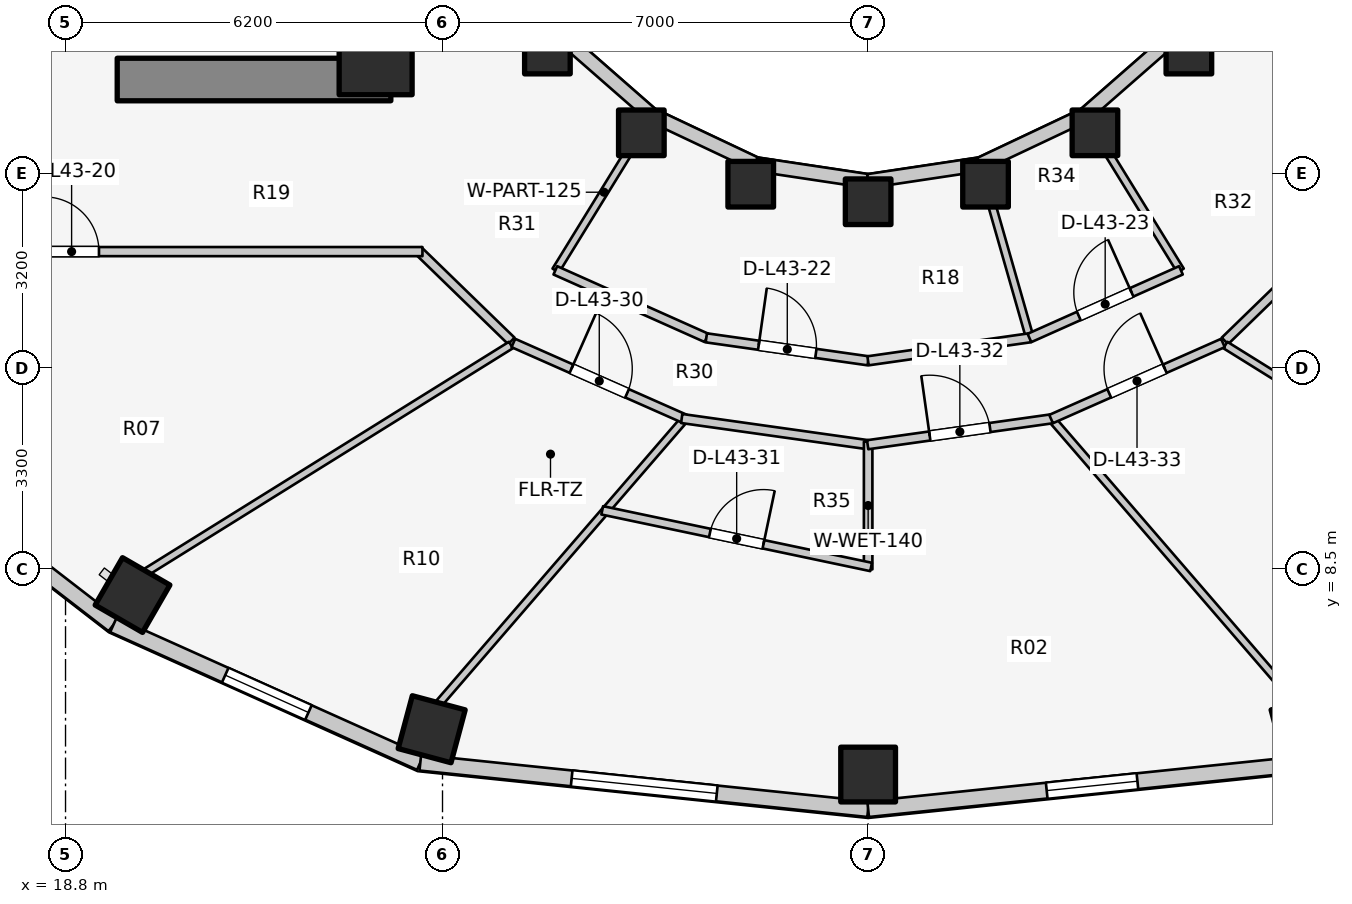
"""IFC4 building model, lengths in metres.
Left out: names, types, materials, properties, quantities, classifications, styles, units other than length and angle.
Written with IfcOpenShell. Run it as: python <this file> out.ifc"""

import sys

from ifc_helpers import new_model, si_unit, direction, frame, frame_2d, origin, origin_2d, place, context, subcontext, project, spatial, rectangle, extrude, element, fill, save


model = new_model("IFC4")
c1 = context("Model", 3, precision=1e-05, world=origin(), true_north=direction((0.0, 1.0)))
c2 = subcontext(c1, "Body", "Model", "MODEL_VIEW")
j1 = project(units=[si_unit("LENGTHUNIT", "METRE"), si_unit("PLANEANGLEUNIT", "RADIAN")], contexts=[c1])
p1 = place(None, origin())
s1 = spatial("IfcSite", under=j1, at=p1, CompositionType="ELEMENT")
p2 = place(p1, origin())
s2 = spatial("IfcBuilding", under=s1, at=p2, CompositionType="ELEMENT")
p3 = place(p2, frame((0.0, 0.0, 143.6)))
s3 = spatial("IfcBuildingStorey", under=s2, at=p3, CompositionType="ELEMENT", Elevation=143.6)
p4 = place(p3, frame((19.65, 16.55, 0.0), z_axis=(0.0, 0.0, 1.0), x_axis=(1.0, 0.0, 0.0)))
e1 = element("IfcWall", 1, at=p4, inside=s3, PredefinedType="SHEAR", context=c2, shape_type="SweptSolid", body=[
    extrude(rectangle(XDim=4.5, YDim=0.7, at=frame_2d((2.25, 0.0))), origin(), (0.0, 0.0, 1.0), 3.1),
])
p5 = place(p3, frame((23.9, 16.9, 0.0), z_axis=(0.0, 0.0, 1.0), x_axis=(1.0, 0.0, 0.0)))
e2 = element("IfcColumn", 2, at=p5, inside=s3, PredefinedType="COLUMN", context=c2, shape_type="SweptSolid", body=[
    extrude(rectangle(XDim=1.2, YDim=1.2, at=origin_2d()), origin(), (0.0, 0.0, 1.0), 3.1),
])
for number, where, z_axis, x_axis in (
    (3, (26.725, 17.018, 0.0), (0.0, 0.0, 1.0), (1.0, 0.0, 0.0)),
    (4, (28.27, 15.673, 0.0), (0.0, 0.0, 1.0), (1.0, 0.0, 0.0)),
):
    element("IfcColumn", number, at=place(p3, frame(where, z_axis=z_axis, x_axis=x_axis)), inside=s3, PredefinedType="COLUMN", context=c2, shape_type="SweptSolid", body=[
        extrude(rectangle(XDim=0.75, YDim=0.75, at=origin_2d()), origin(), (0.0, 0.0, 1.0), 3.1),
    ])
p6 = place(p3, frame((19.902, 8.072, 0.0), z_axis=(0.0, 0.0, 1.0), x_axis=(-0.5, -0.866025403784, 0.0)))
e5 = element("IfcColumn", 5, at=p6, inside=s3, PredefinedType="COLUMN", context=c2, shape_type="SweptSolid", body=[
    extrude(rectangle(XDim=0.9, YDim=0.9, at=origin_2d()), origin(), (0.0, 0.0, 1.0), 3.1),
])
p7 = place(p3, frame((30.069, 14.828, 0.0), z_axis=(0.0, 0.0, 1.0), x_axis=(1.0, 0.0, 0.0)))
e6 = element("IfcColumn", 6, at=p7, inside=s3, PredefinedType="COLUMN", context=c2, shape_type="SweptSolid", body=[
    extrude(rectangle(XDim=0.75, YDim=0.75, at=origin_2d()), origin(), (0.0, 0.0, 1.0), 3.1),
])
p8 = place(p3, frame((24.822, 5.865, 0.0), z_axis=(0.0, 0.0, 1.0), x_axis=(-0.258819045103, -0.965925826289, 0.0)))
e7 = element("IfcColumn", 7, at=p8, inside=s3, PredefinedType="COLUMN", context=c2, shape_type="SweptSolid", body=[
    extrude(rectangle(XDim=0.9, YDim=0.9, at=origin_2d()), origin(), (0.0, 0.0, 1.0), 3.1),
])
p9 = place(p3, frame((32.0, 14.54, 0.0), z_axis=(0.0, 0.0, 1.0), x_axis=(1.0, 0.0, 0.0)))
e8 = element("IfcColumn", 8, at=p9, inside=s3, PredefinedType="COLUMN", context=c2, shape_type="SweptSolid", body=[
    extrude(rectangle(XDim=0.75, YDim=0.75, at=origin_2d()), origin(), (0.0, 0.0, 1.0), 3.1),
])
p10 = place(p3, frame((32.0, 5.12, 0.0), z_axis=(0.0, 0.0, 1.0), x_axis=(0.0, -1.0, 0.0)))
e9 = element("IfcColumn", 9, at=p10, inside=s3, PredefinedType="COLUMN", context=c2, shape_type="SweptSolid", body=[
    extrude(rectangle(XDim=0.9, YDim=0.9, at=origin_2d()), origin(), (0.0, 0.0, 1.0), 3.1),
])
p11 = place(p3, frame((33.931, 14.828, 0.0), z_axis=(0.0, 0.0, 1.0), x_axis=(1.0, 0.0, 0.0)))
e10 = element("IfcColumn", 10, at=p11, inside=s3, PredefinedType="COLUMN", context=c2, shape_type="SweptSolid", body=[
    extrude(rectangle(XDim=0.75, YDim=0.75, at=origin_2d()), origin(), (0.0, 0.0, 1.0), 3.1),
])
p12 = place(p3, frame((39.178, 5.865, 0.0), z_axis=(0.0, 0.0, 1.0), x_axis=(0.258819045103, -0.965925826289, 0.0)))
e11 = element("IfcColumn", 11, at=p12, inside=s3, PredefinedType="COLUMN", context=c2, shape_type="SweptSolid", body=[
    extrude(rectangle(XDim=0.9, YDim=0.9, at=origin_2d()), origin(), (0.0, 0.0, 1.0), 3.1),
])
for number, where, z_axis, x_axis in (
    (12, (35.73, 15.673, 0.0), (0.0, 0.0, 1.0), (1.0, 0.0, 0.0)),
    (13, (37.275, 17.018, 0.0), (0.0, 0.0, 1.0), (1.0, 0.0, 0.0)),
):
    element("IfcColumn", number, at=place(p3, frame(where, z_axis=z_axis, x_axis=x_axis)), inside=s3, PredefinedType="COLUMN", context=c2, shape_type="SweptSolid", body=[
        extrude(rectangle(XDim=0.75, YDim=0.75, at=origin_2d()), origin(), (0.0, 0.0, 1.0), 3.1),
    ])
p13 = place(p3, frame((26.965, 17.258, 0.0), z_axis=(0.0, 0.0, 1.0), x_axis=(0.752576694707, -0.658504607869, 0.0)))
e14 = element("IfcWall", 14, at=p13, inside=s3, PredefinedType="STANDARD", context=c2, shape_type="SweptSolid", body=[
    extrude(rectangle(XDim=1.959, YDim=0.23, at=frame_2d((0.98, 0.0))), origin(), (0.0, 0.0, 1.0), 2.16),
])
p14 = place(p3, frame((28.44, 15.968, 0.0), z_axis=(0.0, 0.0, 1.0), x_axis=(0.904179699603, -0.427152280606, 0.0)))
e15 = element("IfcWall", 15, at=p14, inside=s3, PredefinedType="STANDARD", context=c2, shape_type="SweptSolid", body=[
    extrude(rectangle(XDim=1.899, YDim=0.23, at=frame_2d((0.95, 0.0))), origin(), (0.0, 0.0, 1.0), 2.16),
])
for number, where, z_axis, x_axis in (
    (16, (30.157, 15.157, 0.0), (0.0, 0.0, 1.0), (0.989, -0.149, 0.0)),
    (17, (32.0, 14.88, 0.0), (0.0, 0.0, 1.0), (0.989, 0.149, 0.0)),
):
    element("IfcWall", number, at=place(p3, frame(where, z_axis=z_axis, x_axis=x_axis)), inside=s3, PredefinedType="STANDARD", context=c2, shape_type="SweptSolid", body=[
        extrude(rectangle(XDim=1.864, YDim=0.23, at=frame_2d((0.932, 0.0))), origin(), (0.0, 0.0, 1.0), 2.16),
    ])
p15 = place(p3, frame((33.843, 15.157, 0.0), z_axis=(0.0, 0.0, 1.0), x_axis=(0.904179699603, 0.427152280606, 0.0)))
e18 = element("IfcWall", 18, at=p15, inside=s3, PredefinedType="STANDARD", context=c2, shape_type="SweptSolid", body=[
    extrude(rectangle(XDim=1.899, YDim=0.23, at=frame_2d((0.95, 0.0))), origin(), (0.0, 0.0, 1.0), 2.16),
])
p16 = place(p3, frame((35.56, 15.968, 0.0), z_axis=(0.0, 0.0, 1.0), x_axis=(0.752576694707, 0.658504607869, 0.0)))
e19 = element("IfcWall", 19, at=p16, inside=s3, PredefinedType="STANDARD", context=c2, shape_type="SweptSolid", body=[
    extrude(rectangle(XDim=1.959, YDim=0.23, at=frame_2d((0.98, 0.0))), origin(), (0.0, 0.0, 1.0), 2.16),
])
p17 = place(p3, frame((15.731, 10.559, 0.0), z_axis=(0.0, 0.0, 1.0), x_axis=(0.791460185804, -0.611220724687, 0.0)))
e20 = element("IfcWall", 20, at=p17, inside=s3, PredefinedType="STANDARD", context=c2, shape_type="SweptSolid", body=[
    extrude(rectangle(XDim=4.872, YDim=0.26, at=frame_2d((2.436, 0.0))), origin(), (0.0, 0.0, 1.0), 2.85),
])
p18 = place(p3, frame((19.587, 7.581, 0.0), z_axis=(0.0, 0.0, 1.0), x_axis=(0.912353637112, -0.409403029847, 0.0)))
e21 = element("IfcWall", 21, at=p18, inside=s3, PredefinedType="STANDARD", context=c2, shape_type="SweptSolid", body=[
    extrude(rectangle(XDim=5.533, YDim=0.26, at=frame_2d((2.766, 0.0))), origin(), (0.0, 0.0, 1.0), 2.85),
])
p19 = place(p18, frame((2.016, 0.0, 0.75)))
e22 = element("IfcOpeningElement", 22, at=p19, cuts=e21, PredefinedType="OPENING", context=c2, shape_type="SweptSolid", body=[
    extrude(rectangle(XDim=1.5, YDim=1.6, at=frame_2d((0.75, 0.8))), frame((0.0, 0.14, 0.0), z_axis=(0.0, -1.0, 0.0), x_axis=(1.0, 0.0, 0.0)), (0.0, 0.0, 1.0), 0.28),
])
p20 = place(p3, frame((24.635, 5.315, 0.0), z_axis=(0.0, 0.0, 1.0), x_axis=(0.994664178965, -0.10316574569, 0.0)))
e23 = element("IfcWall", 23, at=p20, inside=s3, PredefinedType="STANDARD", context=c2, shape_type="SweptSolid", body=[
    extrude(rectangle(XDim=7.405, YDim=0.26, at=frame_2d((3.702, 0.0))), origin(), (0.0, 0.0, 1.0), 2.85),
])
p21 = place(p20, frame((2.502, 0.0, 0.75)))
e24 = element("IfcOpeningElement", 24, at=p21, cuts=e23, PredefinedType="OPENING", context=c2, shape_type="SweptSolid", body=[
    extrude(rectangle(XDim=2.4, YDim=1.7, at=frame_2d((1.2, 0.85))), frame((0.0, 0.14, 0.0), z_axis=(0.0, -1.0, 0.0), x_axis=(1.0, 0.0, 0.0)), (0.0, 0.0, 1.0), 0.28),
])
p22 = place(p3, frame((32.0, 4.552, 0.0), z_axis=(0.0, 0.0, 1.0), x_axis=(0.994664178965, 0.10316574569, 0.0)))
e25 = element("IfcWall", 25, at=p22, inside=s3, PredefinedType="STANDARD", context=c2, shape_type="SweptSolid", body=[
    extrude(rectangle(XDim=7.405, YDim=0.26, at=frame_2d((3.702, 0.0))), origin(), (0.0, 0.0, 1.0), 2.85),
])
p23 = place(p22, frame((2.952, 0.0, 0.75)))
e26 = element("IfcOpeningElement", 26, at=p23, cuts=e25, PredefinedType="OPENING", context=c2, shape_type="SweptSolid", body=[
    extrude(rectangle(XDim=1.5, YDim=1.6, at=frame_2d((0.75, 0.8))), frame((0.0, 0.14, 0.0), z_axis=(0.0, -1.0, 0.0), x_axis=(1.0, 0.0, 0.0)), (0.0, 0.0, 1.0), 0.28),
])
p24 = place(p3, frame((26.133, 12.251, 0.0), z_axis=(0.0, 0.0, 1.0), x_axis=(-0.717419568599, 0.696641344302, 0.0)))
e27 = element("IfcWall", 27, at=p24, inside=s3, PredefinedType="PARTITIONING", context=c2, shape_type="SweptSolid", body=[
    extrude(rectangle(XDim=2.138, YDim=0.15, at=frame_2d((1.069, 0.0))), origin(), (0.0, 0.0, 1.0), 2.299),
])
p25 = place(p3, frame((17.15, 13.72, 0.0), z_axis=(0.0, 0.0, 1.0), x_axis=(1.0, 0.0, 0.0)))
e28 = element("IfcWall", 28, at=p25, inside=s3, PredefinedType="PARTITIONING", context=c2, shape_type="SweptSolid", body=[
    extrude(rectangle(XDim=7.52, YDim=0.15, at=frame_2d((3.76, 0.0))), origin(), (0.0, 0.0, 1.0), 2.299),
])
p26 = place(p25, frame((1.3, 0.0, 0.0)))
e29 = element("IfcOpeningElement", 29, at=p26, cuts=e28, PredefinedType="OPENING", context=c2, shape_type="SweptSolid", body=[
    extrude(rectangle(XDim=0.9, YDim=2.1, at=frame_2d((0.45, 1.05))), frame((0.0, 0.085, 0.0), z_axis=(0.0, -1.0, 0.0), x_axis=(1.0, 0.0, 0.0)), (0.0, 0.0, 1.0), 0.17),
])
p27 = place(p3, frame((37.867, 12.251, 0.0), z_axis=(0.0, 0.0, 1.0), x_axis=(0.717419568599, 0.696641344302, 0.0)))
e30 = element("IfcWall", 30, at=p27, inside=s3, PredefinedType="PARTITIONING", context=c2, shape_type="SweptSolid", body=[
    extrude(rectangle(XDim=2.138, YDim=0.15, at=frame_2d((1.069, 0.0))), origin(), (0.0, 0.0, 1.0), 2.299),
])
p28 = place(p3, frame((28.45, 15.985, 0.0), z_axis=(0.0, 0.0, 1.0), x_axis=(-0.524565340045, -0.851370192116, 0.0)))
e31 = element("IfcWall", 31, at=p28, inside=s3, PredefinedType="PARTITIONING", context=c2, shape_type="SweptSolid", body=[
    extrude(rectangle(XDim=3.027, YDim=0.125, at=frame_2d((1.514, 0.0))), origin(), (0.0, 0.0, 1.0), 2.299),
])
p29 = place(p3, frame((33.838, 15.176, 0.0), z_axis=(0.0, 0.0, 1.0), x_axis=(0.274947609893, -0.961459209647, 0.0)))
e32 = element("IfcWall", 32, at=p29, inside=s3, PredefinedType="PARTITIONING", context=c2, shape_type="SweptSolid", body=[
    extrude(rectangle(XDim=2.99, YDim=0.125, at=frame_2d((1.495, 0.0))), origin(), (0.0, 0.0, 1.0), 2.299),
])
p30 = place(p3, frame((35.55, 15.985, 0.0), z_axis=(0.0, 0.0, 1.0), x_axis=(0.524565340045, -0.851370192116, 0.0)))
e33 = element("IfcWall", 33, at=p30, inside=s3, PredefinedType="PARTITIONING", context=c2, shape_type="SweptSolid", body=[
    extrude(rectangle(XDim=3.027, YDim=0.125, at=frame_2d((1.514, 0.0))), origin(), (0.0, 0.0, 1.0), 2.299),
])
p31 = place(p3, frame((26.856, 13.412, 0.0), z_axis=(0.0, 0.0, 1.0), x_axis=(0.912985265053, -0.407992531545, 0.0)))
e34 = element("IfcWall", 34, at=p31, inside=s3, PredefinedType="PARTITIONING", context=c2, shape_type="SweptSolid", body=[
    extrude(rectangle(XDim=2.723, YDim=0.15, at=frame_2d((1.362, 0.0))), origin(), (0.0, 0.0, 1.0), 2.299),
])
p32 = place(p3, frame((29.339, 12.302, 0.0), z_axis=(0.0, 0.0, 1.0), x_axis=(0.990079774468, -0.140506370634, 0.0)))
e35 = element("IfcWall", 35, at=p32, inside=s3, PredefinedType="PARTITIONING", context=c2, shape_type="SweptSolid", body=[
    extrude(rectangle(XDim=2.69, YDim=0.15, at=frame_2d((1.345, 0.0))), origin(), (0.0, 0.0, 1.0), 2.299),
])
p33 = place(p32, frame((0.87, 0.0, 0.0)))
e36 = element("IfcOpeningElement", 36, at=p33, cuts=e35, PredefinedType="OPENING", context=c2, shape_type="SweptSolid", body=[
    extrude(rectangle(XDim=0.95, YDim=2.1, at=frame_2d((0.475, 1.05))), frame((0.0, 0.085, 0.0), z_axis=(0.0, -1.0, 0.0), x_axis=(1.0, 0.0, 0.0)), (0.0, 0.0, 1.0), 0.17),
])
p34 = place(p3, frame((31.998, 11.924, 0.0), z_axis=(0.0, 0.0, 1.0), x_axis=(0.990041682628, 0.140774524184, 0.0)))
e37 = element("IfcWall", 37, at=p34, inside=s3, PredefinedType="PARTITIONING", context=c2, shape_type="SweptSolid", body=[
    extrude(rectangle(XDim=2.695, YDim=0.15, at=frame_2d((1.348, 0.0))), origin(), (0.0, 0.0, 1.0), 2.299),
])
p35 = place(p3, frame((34.653, 12.299, 0.0), z_axis=(0.0, 0.0, 1.0), x_axis=(0.913112902883, 0.407706789971, 0.0)))
e38 = element("IfcWall", 38, at=p35, inside=s3, PredefinedType="PARTITIONING", context=c2, shape_type="SweptSolid", body=[
    extrude(rectangle(XDim=2.729, YDim=0.15, at=frame_2d((1.364, 0.0))), origin(), (0.0, 0.0, 1.0), 2.299),
])
p36 = place(p35, frame((0.889, 0.0, 0.0)))
e39 = element("IfcOpeningElement", 39, at=p36, cuts=e38, PredefinedType="OPENING", context=c2, shape_type="SweptSolid", body=[
    extrude(rectangle(XDim=0.95, YDim=2.1, at=frame_2d((0.475, 1.05))), frame((0.0, 0.085, 0.0), z_axis=(0.0, -1.0, 0.0), x_axis=(1.0, 0.0, 0.0)), (0.0, 0.0, 1.0), 0.17),
])
p37 = place(p3, frame((26.125, 12.184, 0.0), z_axis=(0.0, 0.0, 1.0), x_axis=(-0.849008457073, -0.528379257559, 0.0)))
e40 = element("IfcWall", 40, at=p37, inside=s3, PredefinedType="PARTITIONING", context=c2, shape_type="SweptSolid", body=[
    extrude(rectangle(XDim=7.077, YDim=0.125, at=frame_2d((3.539, 0.0))), origin(), (0.0, 0.0, 1.0), 2.299),
])
for number, where, z_axis, x_axis in (
    (41, (28.947, 10.927, 0.0), (0.0, 0.0, 1.0), (-0.654, -0.757, 0.0)),
    (42, (35.053, 10.927, 0.0), (0.0, 0.0, 1.0), (0.654, -0.757, 0.0)),
):
    element("IfcWall", number, at=place(p3, frame(where, z_axis=z_axis, x_axis=x_axis)), inside=s3, PredefinedType="PARTITIONING", context=c2, shape_type="SweptSolid", body=[
        extrude(rectangle(XDim=6.14, YDim=0.125, at=frame_2d((3.07, 0.0))), origin(), (0.0, 0.0, 1.0), 2.299),
    ])
p38 = place(p3, frame((37.875, 12.184, 0.0), z_axis=(0.0, 0.0, 1.0), x_axis=(0.849008457073, -0.528379257559, 0.0)))
e43 = element("IfcWall", 43, at=p38, inside=s3, PredefinedType="PARTITIONING", context=c2, shape_type="SweptSolid", body=[
    extrude(rectangle(XDim=7.077, YDim=0.125, at=frame_2d((3.539, 0.0))), origin(), (0.0, 0.0, 1.0), 2.299),
])
p39 = place(p3, frame((26.165, 12.217, 0.0), z_axis=(0.0, 0.0, 1.0), x_axis=(0.91445214467, -0.404694051239, 0.0)))
e44 = element("IfcWall", 44, at=p39, inside=s3, PredefinedType="PARTITIONING", context=c2, shape_type="SweptSolid", body=[
    extrude(rectangle(XDim=3.091, YDim=0.15, at=frame_2d((1.545, 0.0))), origin(), (0.0, 0.0, 1.0), 2.299),
])
p40 = place(p39, frame((1.045, 0.0, 0.0)))
e45 = element("IfcOpeningElement", 45, at=p40, cuts=e44, PredefinedType="OPENING", context=c2, shape_type="SweptSolid", body=[
    extrude(rectangle(XDim=1.0, YDim=2.1, at=frame_2d((0.5, 1.05))), frame((0.0, 0.085, 0.0), z_axis=(0.0, -1.0, 0.0), x_axis=(1.0, 0.0, 0.0)), (0.0, 0.0, 1.0), 0.17),
])
p41 = place(p3, frame((28.934, 10.975, 0.0), z_axis=(0.0, 0.0, 1.0), x_axis=(0.990254405439, -0.139270285808, 0.0)))
e46 = element("IfcWall", 46, at=p41, inside=s3, PredefinedType="PARTITIONING", context=c2, shape_type="SweptSolid", body=[
    extrude(rectangle(XDim=3.147, YDim=0.15, at=frame_2d((1.573, 0.0))), origin(), (0.0, 0.0, 1.0), 2.299),
])
p42 = place(p3, frame((32.0, 10.594, 0.0), z_axis=(0.0, 0.0, 1.0), x_axis=(0.0, -1.0, 0.0)))
e47 = element("IfcWall", 47, at=p42, inside=s3, PredefinedType="PLUMBINGWALL", context=c2, shape_type="SweptSolid", body=[
    extrude(rectangle(XDim=2.1, YDim=0.14, at=frame_2d((1.05, 0.0))), origin(), (0.0, 0.0, 1.0), 2.299),
])
p43 = place(p3, frame((27.627, 9.465, 0.0), z_axis=(0.0, 0.0, 1.0), x_axis=(0.97851996891, -0.206152056609, 0.0)))
e48 = element("IfcWall", 48, at=p43, inside=s3, PredefinedType="PLUMBINGWALL", context=c2, shape_type="SweptSolid", body=[
    extrude(rectangle(XDim=4.519, YDim=0.14, at=frame_2d((2.26, 0.0))), origin(), (0.0, 0.0, 1.0), 2.299),
])
p44 = place(p43, frame((1.81, 0.0, 0.0)))
e49 = element("IfcOpeningElement", 49, at=p44, cuts=e48, PredefinedType="OPENING", context=c2, shape_type="SweptSolid", body=[
    extrude(rectangle(XDim=0.9, YDim=2.1, at=frame_2d((0.45, 1.05))), frame((0.0, 0.08, 0.0), z_axis=(0.0, -1.0, 0.0), x_axis=(1.0, 0.0, 0.0)), (0.0, 0.0, 1.0), 0.16),
])
p45 = place(p3, frame((31.992, 10.544, 0.0), z_axis=(0.0, 0.0, 1.0), x_axis=(0.990243864279, 0.139345216129, 0.0)))
e50 = element("IfcWall", 50, at=p45, inside=s3, PredefinedType="PARTITIONING", context=c2, shape_type="SweptSolid", body=[
    extrude(rectangle(XDim=3.062, YDim=0.15, at=frame_2d((1.531, 0.0))), origin(), (0.0, 0.0, 1.0), 2.299),
])
p46 = place(p45, frame((1.031, 0.0, 0.0)))
e51 = element("IfcOpeningElement", 51, at=p46, cuts=e50, PredefinedType="OPENING", context=c2, shape_type="SweptSolid", body=[
    extrude(rectangle(XDim=1.0, YDim=2.1, at=frame_2d((0.5, 1.05))), frame((0.0, 0.085, 0.0), z_axis=(0.0, -1.0, 0.0), x_axis=(1.0, 0.0, 0.0)), (0.0, 0.0, 1.0), 0.17),
])
p47 = place(p3, frame((35.009, 10.966, 0.0), z_axis=(0.0, 0.0, 1.0), x_axis=(0.91445214467, 0.404694051239, 0.0)))
e52 = element("IfcWall", 52, at=p47, inside=s3, PredefinedType="PARTITIONING", context=c2, shape_type="SweptSolid", body=[
    extrude(rectangle(XDim=3.091, YDim=0.15, at=frame_2d((1.545, 0.0))), origin(), (0.0, 0.0, 1.0), 2.299),
])
p48 = place(p47, frame((1.045, 0.0, 0.0)))
e53 = element("IfcOpeningElement", 53, at=p48, cuts=e52, PredefinedType="OPENING", context=c2, shape_type="SweptSolid", body=[
    extrude(rectangle(XDim=1.0, YDim=2.1, at=frame_2d((0.5, 1.05))), frame((0.0, 0.085, 0.0), z_axis=(0.0, -1.0, 0.0), x_axis=(1.0, 0.0, 0.0)), (0.0, 0.0, 1.0), 0.17),
])
p49 = place(p19, origin())
e54 = element("IfcWindow", 54, at=p49, inside=s3, PartitioningType="SINGLE_PANEL", PredefinedType="WINDOW", context=c2, shape_type="SweptSolid", body=[
    extrude(rectangle(XDim=1.5, YDim=1.6, at=frame_2d((0.75, 0.8))), frame((0.0, 0.03, 0.0), z_axis=(0.0, -1.0, 0.0), x_axis=(1.0, 0.0, 0.0)), (0.0, 0.0, 1.0), 0.06),
])
fill(e22, e54)
p50 = place(p21, origin())
e55 = element("IfcWindow", 55, at=p50, inside=s3, PartitioningType="SINGLE_PANEL", PredefinedType="WINDOW", context=c2, shape_type="SweptSolid", body=[
    extrude(rectangle(XDim=2.4, YDim=1.7, at=frame_2d((1.2, 0.85))), frame((0.0, 0.03, 0.0), z_axis=(0.0, -1.0, 0.0), x_axis=(1.0, 0.0, 0.0)), (0.0, 0.0, 1.0), 0.06),
])
fill(e24, e55)
p51 = place(p23, origin())
e56 = element("IfcWindow", 56, at=p51, inside=s3, PartitioningType="SINGLE_PANEL", PredefinedType="WINDOW", context=c2, shape_type="SweptSolid", body=[
    extrude(rectangle(XDim=1.5, YDim=1.6, at=frame_2d((0.75, 0.8))), frame((0.0, 0.03, 0.0), z_axis=(0.0, -1.0, 0.0), x_axis=(1.0, 0.0, 0.0)), (0.0, 0.0, 1.0), 0.06),
])
fill(e26, e56)
p52 = place(p26, origin())
e57 = element("IfcDoor", 57, at=p52, inside=s3, OperationType="SINGLE_SWING_LEFT", PredefinedType="DOOR", context=c2, shape_type="SweptSolid", body=[
    extrude(rectangle(XDim=0.9, YDim=2.1, at=frame_2d((0.45, 1.05))), frame((0.0, 0.025, 0.0), z_axis=(0.0, -1.0, 0.0), x_axis=(1.0, 0.0, 0.0)), (0.0, 0.0, 1.0), 0.05),
])
fill(e29, e57)
p53 = place(p33, origin())
e58 = element("IfcDoor", 58, at=p53, inside=s3, OperationType="SINGLE_SWING_LEFT", PredefinedType="DOOR", context=c2, shape_type="SweptSolid", body=[
    extrude(rectangle(XDim=0.95, YDim=2.1, at=frame_2d((0.475, 1.05))), frame((0.0, 0.025, 0.0), z_axis=(0.0, -1.0, 0.0), x_axis=(1.0, 0.0, 0.0)), (0.0, 0.0, 1.0), 0.05),
])
fill(e36, e58)
p54 = place(p36, origin())
e59 = element("IfcDoor", 59, at=p54, inside=s3, OperationType="SINGLE_SWING_RIGHT", PredefinedType="DOOR", context=c2, shape_type="SweptSolid", body=[
    extrude(rectangle(XDim=0.95, YDim=2.1, at=frame_2d((0.475, 1.05))), frame((0.0, 0.025, 0.0), z_axis=(0.0, -1.0, 0.0), x_axis=(1.0, 0.0, 0.0)), (0.0, 0.0, 1.0), 0.05),
])
fill(e39, e59)
p55 = place(p40, origin())
e60 = element("IfcDoor", 60, at=p55, inside=s3, OperationType="SINGLE_SWING_LEFT", PredefinedType="DOOR", context=c2, shape_type="SweptSolid", body=[
    extrude(rectangle(XDim=1.0, YDim=2.1, at=frame_2d((0.5, 1.05))), frame((0.0, 0.025, 0.0), z_axis=(0.0, -1.0, 0.0), x_axis=(1.0, 0.0, 0.0)), (0.0, 0.0, 1.0), 0.05),
])
fill(e45, e60)
p56 = place(p44, origin())
e61 = element("IfcDoor", 61, at=p56, inside=s3, OperationType="SINGLE_SWING_RIGHT", PredefinedType="DOOR", context=c2, shape_type="SweptSolid", body=[
    extrude(rectangle(XDim=0.9, YDim=2.1, at=frame_2d((0.45, 1.05))), frame((0.0, 0.025, 0.0), z_axis=(0.0, -1.0, 0.0), x_axis=(1.0, 0.0, 0.0)), (0.0, 0.0, 1.0), 0.05),
])
fill(e49, e61)
p57 = place(p46, origin())
e62 = element("IfcDoor", 62, at=p57, inside=s3, OperationType="SINGLE_SWING_LEFT", PredefinedType="DOOR", context=c2, shape_type="SweptSolid", body=[
    extrude(rectangle(XDim=1.0, YDim=2.1, at=frame_2d((0.5, 1.05))), frame((0.0, 0.025, 0.0), z_axis=(0.0, -1.0, 0.0), x_axis=(1.0, 0.0, 0.0)), (0.0, 0.0, 1.0), 0.05),
])
fill(e51, e62)
p58 = place(p48, origin())
e63 = element("IfcDoor", 63, at=p58, inside=s3, OperationType="SINGLE_SWING_RIGHT", PredefinedType="DOOR", context=c2, shape_type="SweptSolid", body=[
    extrude(rectangle(XDim=1.0, YDim=2.1, at=frame_2d((0.5, 1.05))), frame((0.0, 0.025, 0.0), z_axis=(0.0, -1.0, 0.0), x_axis=(1.0, 0.0, 0.0)), (0.0, 0.0, 1.0), 0.05),
])
fill(e53, e63)
save(model, sys.argv[1])
